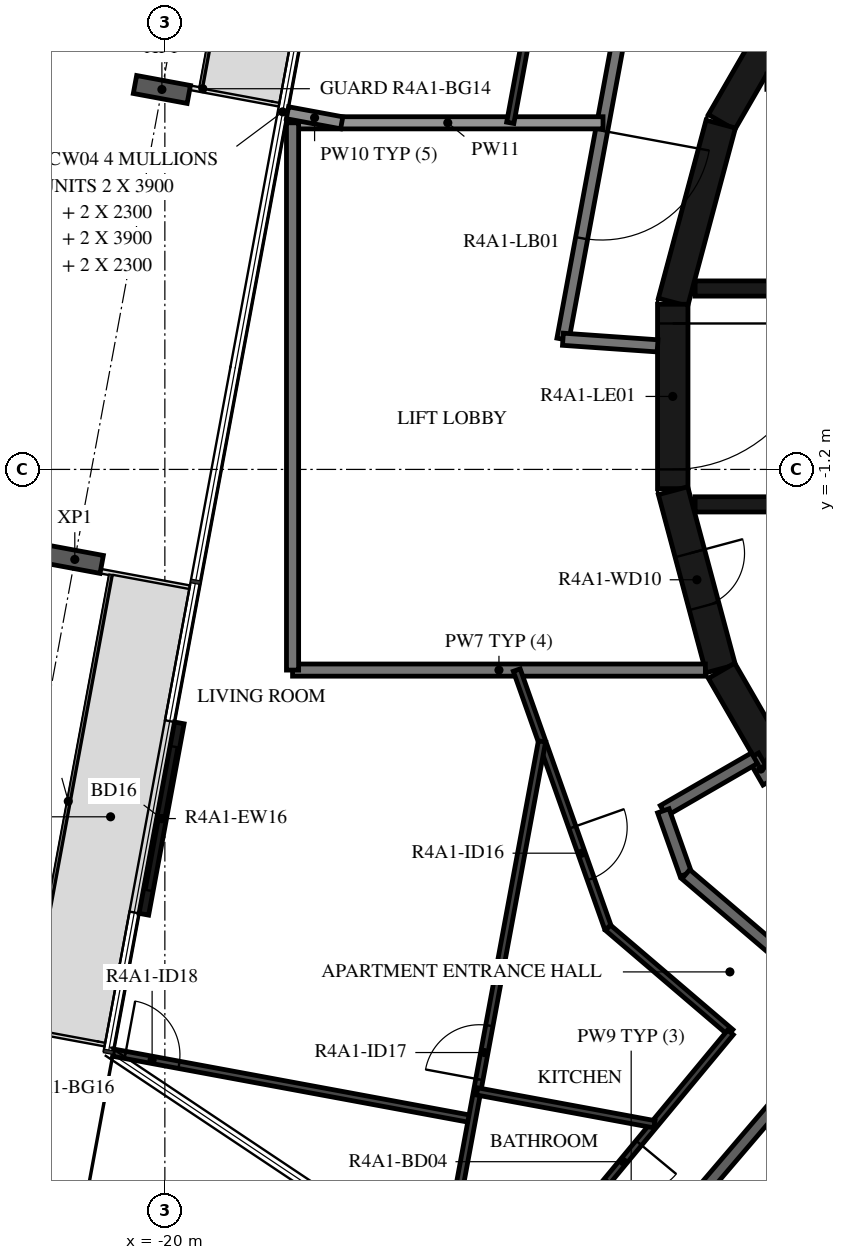
"""IFC4 building model, lengths in metres.
Left out: names, types, materials, properties, quantities, classifications, styles, units other than length and angle.
Written with IfcOpenShell. Run it as: python <this file> out.ifc"""

import sys

from ifc_helpers import new_model, si_unit, direction, frame, frame_2d, origin, origin_2d, place, context, subcontext, project, spatial, rectangle, i_section, extrude, element, fill, save


model = new_model("IFC4")
c1 = context("Model", 3, precision=1e-05, world=origin(), true_north=direction((0.0, 1.0)))
c2 = subcontext(c1, "Body", "Model", "MODEL_VIEW")
j1 = project(units=[si_unit("LENGTHUNIT", "METRE"), si_unit("PLANEANGLEUNIT", "RADIAN")], contexts=[c1])
p1 = place(None, origin())
s1 = spatial("IfcSite", under=j1, at=p1, CompositionType="ELEMENT")
p2 = place(p1, origin())
s2 = spatial("IfcBuilding", under=s1, at=p2, CompositionType="ELEMENT")
p3 = place(p2, frame((0.0, 0.0, 155.2)))
s3 = spatial("IfcBuildingStorey", under=s2, at=p3, CompositionType="ELEMENT", Elevation=155.2)
for number, where, z_axis, x_axis in (
    (1, (-20.049, 5.048, -0.38), (0.0, 0.0, 1.0), (0.182, 0.983, 0.0)),
    (2, (-21.481, -2.68, -0.38), (0.0, 0.0, 1.0), (0.182, 0.983, 0.0)),
):
    element("IfcColumn", number, at=place(p3, frame(where, z_axis=z_axis, x_axis=x_axis)), inside=s3, PredefinedType="COLUMN", context=c2, shape_type="SweptSolid", body=[
        extrude(i_section(OverallWidth=0.3, OverallDepth=0.9, WebThickness=0.019, FlangeThickness=0.035, FilletRadius=0.03, at=origin_2d()), origin(), (0.0, 0.0, 1.0), 3.5),
    ])
p4 = place(p3, frame((-19.762, -5.369, 0.0), z_axis=(0.0, 0.0, 1.0), x_axis=(-0.18226136951, -0.983250117307, 0.0)))
e3 = element("IfcWall", 3, at=p4, inside=s3, PredefinedType="STANDARD", context=c2, shape_type="SweptSolid", body=[
    extrude(rectangle(XDim=3.2, YDim=0.16, at=frame_2d((1.6, 0.0))), origin(), (0.0, 0.0, 1.0), 3.12),
])
p5 = place(p4, frame((0.4, 0.0, 0.0)))
e4 = element("IfcOpeningElement", 4, at=p5, cuts=e3, PredefinedType="OPENING", context=c2, shape_type="SweptSolid", body=[
    extrude(rectangle(XDim=2.4, YDim=2.4, at=frame_2d((1.2, 1.2))), frame((0.0, 0.09, 0.0), z_axis=(0.0, -1.0, 0.0), x_axis=(1.0, 0.0, 0.0)), (0.0, 0.0, 1.0), 0.18),
])
for number, where, z_axis, x_axis in (
    (5, (-9.329, 7.137, 0.0), (0.0, 0.0, 1.0), (-0.5, -0.866, 0.0)),
    (6, (-10.858, 4.479, 0.0), (0.0, 0.0, 1.0), (-0.259, -0.966, 0.0)),
):
    element("IfcWall", number, at=place(p3, frame(where, z_axis=z_axis, x_axis=x_axis)), inside=s3, PredefinedType="SHEAR", context=c2, shape_type="SweptSolid", body=[
        extrude(rectangle(XDim=3.033, YDim=0.5, at=frame_2d((1.516, 0.0))), origin(), (0.0, 0.0, 1.0), 3.12),
    ])
p6 = place(p3, frame((-11.647, 1.516, 0.0), z_axis=(0.0, 0.0, 1.0), x_axis=(0.0, -1.0, 0.0)))
e7 = element("IfcWall", 7, at=p6, inside=s3, PredefinedType="SHEAR", context=c2, shape_type="SweptSolid", body=[
    extrude(rectangle(XDim=3.033, YDim=0.5, at=frame_2d((1.516, 0.0))), origin(), (0.0, 0.0, 1.0), 3.12),
])
p7 = place(p6, frame((0.316, 0.0, 0.0)))
e8 = element("IfcOpeningElement", 8, at=p7, cuts=e7, PredefinedType="OPENING", context=c2, shape_type="SweptSolid", body=[
    extrude(rectangle(XDim=2.4, YDim=2.1, at=frame_2d((1.2, 1.05))), frame((0.0, 0.26, 0.0), z_axis=(0.0, -1.0, 0.0), x_axis=(1.0, 0.0, 0.0)), (0.0, 0.0, 1.0), 0.52),
])
p8 = place(p3, frame((-11.643, -1.55, 0.0), z_axis=(0.0, 0.0, 1.0), x_axis=(0.258734743916, -0.965948410781, 0.0)))
e9 = element("IfcWall", 9, at=p8, inside=s3, PredefinedType="SHEAR", context=c2, shape_type="SweptSolid", body=[
    extrude(rectangle(XDim=3.033, YDim=0.5, at=frame_2d((1.516, 0.0))), origin(), (0.0, 0.0, 1.0), 3.12),
])
p9 = place(p8, frame((1.066, 0.0, 0.0)))
e10 = element("IfcOpeningElement", 10, at=p9, cuts=e9, PredefinedType="OPENING", context=c2, shape_type="SweptSolid", body=[
    extrude(rectangle(XDim=0.9, YDim=2.1, at=frame_2d((0.45, 1.05))), frame((0.0, 0.26, 0.0), z_axis=(0.0, -1.0, 0.0), x_axis=(1.0, 0.0, 0.0)), (0.0, 0.0, 1.0), 0.52),
])
p10 = place(p3, frame((-10.845, -4.51, 0.0), z_axis=(0.0, 0.0, 1.0), x_axis=(0.500087131594, -0.865975092491, 0.0)))
e11 = element("IfcWall", 11, at=p10, inside=s3, PredefinedType="SHEAR", context=c2, shape_type="SweptSolid", body=[
    extrude(rectangle(XDim=3.033, YDim=0.5, at=frame_2d((1.516, 0.0))), origin(), (0.0, 0.0, 1.0), 3.12),
])
p11 = place(p3, frame((-11.28, 1.775, 0.0), z_axis=(0.0, 0.0, 1.0), x_axis=(1.0, 0.0, 0.0)))
e12 = element("IfcWall", 12, at=p11, inside=s3, PredefinedType="SHEAR", context=c2, shape_type="SweptSolid", body=[
    extrude(rectangle(XDim=14.38, YDim=0.25, at=frame_2d((7.19, 0.0))), origin(), (0.0, 0.0, 1.0), 3.12),
])
p12 = place(p11, frame((10.73, 0.0, 0.0)))
e13 = element("IfcOpeningElement", 13, at=p12, cuts=e12, PredefinedType="OPENING", context=c2, shape_type="SweptSolid", body=[
    extrude(rectangle(XDim=1.1, YDim=2.1, at=frame_2d((0.55, 1.05))), frame((0.0, 0.135, 0.0), z_axis=(0.0, -1.0, 0.0), x_axis=(1.0, 0.0, 0.0)), (0.0, 0.0, 1.0), 0.27),
])
p13 = place(p11, frame((12.88, 0.0, 0.0)))
e14 = element("IfcOpeningElement", 14, at=p13, cuts=e12, PredefinedType="OPENING", context=c2, shape_type="SweptSolid", body=[
    extrude(rectangle(XDim=1.1, YDim=2.1, at=frame_2d((0.55, 1.05))), frame((0.0, 0.135, 0.0), z_axis=(0.0, -1.0, 0.0), x_axis=(1.0, 0.0, 0.0)), (0.0, 0.0, 1.0), 0.27),
])
p14 = place(p11, frame((5.455, 0.0, 0.0)))
e15 = element("IfcOpeningElement", 15, at=p14, cuts=e12, PredefinedType="OPENING", context=c2, shape_type="SweptSolid", body=[
    extrude(rectangle(XDim=0.9, YDim=2.1, at=frame_2d((0.45, 1.05))), frame((0.0, 0.135, 0.0), z_axis=(0.0, -1.0, 0.0), x_axis=(1.0, 0.0, 0.0)), (0.0, 0.0, 1.0), 0.27),
])
p15 = place(p3, frame((-11.28, -1.775, 0.0), z_axis=(0.0, 0.0, 1.0), x_axis=(1.0, 0.0, 0.0)))
e16 = element("IfcWall", 16, at=p15, inside=s3, PredefinedType="SHEAR", context=c2, shape_type="SweptSolid", body=[
    extrude(rectangle(XDim=14.38, YDim=0.25, at=frame_2d((7.19, 0.0))), origin(), (0.0, 0.0, 1.0), 3.12),
])
p16 = place(p15, frame((12.88, 0.0, 0.0)))
e17 = element("IfcOpeningElement", 17, at=p16, cuts=e16, PredefinedType="OPENING", context=c2, shape_type="SweptSolid", body=[
    extrude(rectangle(XDim=1.1, YDim=2.1, at=frame_2d((0.55, 1.05))), frame((0.0, 0.135, 0.0), z_axis=(0.0, -1.0, 0.0), x_axis=(1.0, 0.0, 0.0)), (0.0, 0.0, 1.0), 0.27),
])
p17 = place(p15, frame((6.53, 0.0, 0.0)))
e18 = element("IfcOpeningElement", 18, at=p17, cuts=e16, PredefinedType="OPENING", context=c2, shape_type="SweptSolid", body=[
    extrude(rectangle(XDim=0.9, YDim=2.1, at=frame_2d((0.45, 1.05))), frame((0.0, 0.135, 0.0), z_axis=(0.0, -1.0, 0.0), x_axis=(1.0, 0.0, 0.0)), (0.0, 0.0, 1.0), 0.27),
])
p18 = place(p15, frame((8.68, 0.0, 0.0)))
e19 = element("IfcOpeningElement", 19, at=p18, cuts=e16, PredefinedType="OPENING", context=c2, shape_type="SweptSolid", body=[
    extrude(rectangle(XDim=0.9, YDim=2.1, at=frame_2d((0.45, 1.05))), frame((0.0, 0.135, 0.0), z_axis=(0.0, -1.0, 0.0), x_axis=(1.0, 0.0, 0.0)), (0.0, 0.0, 1.0), 0.27),
])
p19 = place(p15, frame((10.83, 0.0, 0.0)))
e20 = element("IfcOpeningElement", 20, at=p19, cuts=e16, PredefinedType="OPENING", context=c2, shape_type="SweptSolid", body=[
    extrude(rectangle(XDim=0.9, YDim=2.1, at=frame_2d((0.45, 1.05))), frame((0.0, 0.135, 0.0), z_axis=(0.0, -1.0, 0.0), x_axis=(1.0, 0.0, 0.0)), (0.0, 0.0, 1.0), 0.27),
])
p20 = place(p3, frame((-12.521, 5.972, 0.0), z_axis=(0.0, 0.0, 1.0), x_axis=(-0.182251559718, -0.983251935661, 0.0)))
e21 = element("IfcWall", 21, at=p20, inside=s3, PredefinedType="STANDARD", context=c2, shape_type="SweptSolid", body=[
    extrude(rectangle(XDim=5.117, YDim=0.2, at=frame_2d((2.559, 0.0))), origin(), (0.0, 0.0, 1.0), 3.12),
])
p21 = place(p20, frame((1.627, 0.0, 0.0)))
e22 = element("IfcOpeningElement", 22, at=p21, cuts=e21, PredefinedType="OPENING", context=c2, shape_type="SweptSolid", body=[
    extrude(rectangle(XDim=1.8, YDim=2.1, at=frame_2d((0.9, 1.05))), frame((0.0, 0.11, 0.0), z_axis=(0.0, -1.0, 0.0), x_axis=(1.0, 0.0, 0.0)), (0.0, 0.0, 1.0), 0.22),
])
p22 = place(p3, frame((-13.454, 0.941, 0.0), z_axis=(0.0, 0.0, 1.0), x_axis=(0.99755155062, -0.069934997354, 0.0)))
e23 = element("IfcWall", 23, at=p22, inside=s3, PredefinedType="STANDARD", context=c2, shape_type="SweptSolid", body=[
    extrude(rectangle(XDim=1.561, YDim=0.2, at=frame_2d((0.78, 0.0))), origin(), (0.0, 0.0, 1.0), 3.12),
])
p23 = place(p3, frame((-10.323, -5.914, 0.0), z_axis=(0.0, 0.0, 1.0), x_axis=(0.500137201729, -0.865946175837, 0.0)))
e24 = element("IfcWall", 24, at=p23, inside=s3, PredefinedType="STANDARD", context=c2, shape_type="SweptSolid", body=[
    extrude(rectangle(XDim=0.492, YDim=0.2, at=frame_2d((0.246, 0.0))), origin(), (0.0, 0.0, 1.0), 3.12),
])
p24 = place(p3, frame((-10.303, -5.949, 0.0), z_axis=(0.0, 0.0, 1.0), x_axis=(-0.866021168401, -0.500007335828, 0.0)))
e25 = element("IfcWall", 25, at=p24, inside=s3, PredefinedType="STANDARD", context=c2, shape_type="SweptSolid", body=[
    extrude(rectangle(XDim=1.731, YDim=0.2, at=frame_2d((0.865, 0.0))), origin(), (0.0, 0.0, 1.0), 3.12),
])
p25 = place(p3, frame((-11.802, -6.814, 0.0), z_axis=(0.0, 0.0, 1.0), x_axis=(0.333904297771, -0.942606980629, 0.0)))
e26 = element("IfcWall", 26, at=p25, inside=s3, PredefinedType="STANDARD", context=c2, shape_type="SweptSolid", body=[
    extrude(rectangle(XDim=1.107, YDim=0.2, at=frame_2d((0.553, 0.0))), origin(), (0.0, 0.0, 1.0), 3.12),
])
p26 = place(p3, frame((-11.433, -7.858, 0.0), z_axis=(0.0, 0.0, 1.0), x_axis=(0.760412154545, -0.649440801937, 0.0)))
e27 = element("IfcWall", 27, at=p26, inside=s3, PredefinedType="STANDARD", context=c2, shape_type="SweptSolid", body=[
    extrude(rectangle(XDim=7.181, YDim=0.2, at=frame_2d((3.59, 0.0))), origin(), (0.0, 0.0, 1.0), 3.12),
])
p27 = place(p26, frame((2.39, 0.0, 0.0)))
e28 = element("IfcOpeningElement", 28, at=p27, cuts=e27, PredefinedType="OPENING", context=c2, shape_type="SweptSolid", body=[
    extrude(rectangle(XDim=1.0, YDim=2.1, at=frame_2d((0.5, 1.05))), frame((0.0, 0.11, 0.0), z_axis=(0.0, -1.0, 0.0), x_axis=(1.0, 0.0, 0.0)), (0.0, 0.0, 1.0), 0.22),
])
p28 = place(p3, frame((-12.794, 4.5, 0.0), z_axis=(0.0, 0.0, 1.0), x_axis=(-1.0, 0.0, 0.0)))
e29 = element("IfcWall", 29, at=p28, inside=s3, PredefinedType="STANDARD", context=c2, shape_type="SweptSolid", body=[
    extrude(rectangle(XDim=5.106, YDim=0.2, at=frame_2d((2.553, 0.0))), origin(), (0.0, 0.0, 1.0), 2.73),
])
p29 = place(p3, frame((-17.9, -4.5, 0.0), z_axis=(0.0, 0.0, 1.0), x_axis=(1.0, 0.0, 0.0)))
e30 = element("IfcWall", 30, at=p29, inside=s3, PredefinedType="STANDARD", context=c2, shape_type="SweptSolid", body=[
    extrude(rectangle(XDim=6.789, YDim=0.2, at=frame_2d((3.394, 0.0))), origin(), (0.0, 0.0, 1.0), 3.12),
])
p30 = place(p3, frame((-17.9, 4.5, 0.0), z_axis=(0.0, 0.0, 1.0), x_axis=(0.0, -1.0, 0.0)))
e31 = element("IfcWall", 31, at=p30, inside=s3, PredefinedType="STANDARD", context=c2, shape_type="SweptSolid", body=[
    extrude(rectangle(XDim=9.0, YDim=0.2, at=frame_2d((4.5, 0.0))), origin(), (0.0, 0.0, 1.0), 3.12),
])
p31 = place(p3, frame((-17.984, 4.665, 0.0), z_axis=(0.0, 0.0, 1.0), x_axis=(0.98328378843, -0.182079629313, 0.0)))
e32 = element("IfcWall", 32, at=p31, inside=s3, PredefinedType="STANDARD", context=c2, shape_type="SweptSolid", body=[
    extrude(rectangle(XDim=0.908, YDim=0.2, at=frame_2d((0.454, 0.0))), origin(), (0.0, 0.0, 1.0), 2.73),
])
p32 = place(p3, frame((-11.838, -13.86, 0.0), z_axis=(0.0, 0.0, 1.0), x_axis=(0.64944503311, 0.760408540831, 0.0)))
e33 = element("IfcWall", 33, at=p32, inside=s3, PredefinedType="STANDARD", context=c2, shape_type="SweptSolid", body=[
    extrude(rectangle(XDim=4.827, YDim=0.2, at=frame_2d((2.414, 0.0))), origin(), (0.0, 0.0, 1.0), 3.12),
])
p33 = place(p3, frame((-13.923, 6.641, 0.0), z_axis=(0.0, 0.0, 1.0), x_axis=(-0.182209715759, -0.983259690765, 0.0)))
e34 = element("IfcWall", 34, at=p33, inside=s3, PredefinedType="PARTITIONING", context=c2, shape_type="SweptSolid", body=[
    extrude(rectangle(XDim=2.177, YDim=0.12, at=frame_2d((1.089, 0.0))), origin(), (0.0, 0.0, 1.0), 3.12),
])
p34 = place(p3, frame((-14.213, -4.5, 0.0), z_axis=(0.0, 0.0, 1.0), x_axis=(0.333802904542, -0.942642891513, 0.0)))
e35 = element("IfcWall", 35, at=p34, inside=s3, PredefinedType="PARTITIONING", context=c2, shape_type="SweptSolid", body=[
    extrude(rectangle(XDim=4.495, YDim=0.12, at=frame_2d((2.248, 0.0))), origin(), (0.0, 0.0, 1.0), 3.12),
])
p35 = place(p34, frame((2.744, 0.0, 0.0)))
e36 = element("IfcOpeningElement", 36, at=p35, cuts=e35, PredefinedType="OPENING", context=c2, shape_type="SweptSolid", body=[
    extrude(rectangle(XDim=0.9, YDim=2.1, at=frame_2d((0.45, 1.05))), frame((0.0, 0.07, 0.0), z_axis=(0.0, -1.0, 0.0), x_axis=(1.0, 0.0, 0.0)), (0.0, 0.0, 1.0), 0.14),
])
p36 = place(p3, frame((-12.713, -8.737, 0.0), z_axis=(0.0, 0.0, 1.0), x_axis=(0.760400223405, -0.649454771517, 0.0)))
e37 = element("IfcWall", 37, at=p36, inside=s3, PredefinedType="PARTITIONING", context=c2, shape_type="SweptSolid", body=[
    extrude(rectangle(XDim=2.649, YDim=0.12, at=frame_2d((1.325, 0.0))), origin(), (0.0, 0.0, 1.0), 3.12),
])
p37 = place(p3, frame((-10.698, -10.458, 0.0), z_axis=(0.0, 0.0, 1.0), x_axis=(-0.63830561059, -0.769783052223, 0.0)))
e38 = element("IfcWall", 38, at=p37, inside=s3, PredefinedType="PARTITIONING", context=c2, shape_type="SweptSolid", body=[
    extrude(rectangle(XDim=5.131, YDim=0.12, at=frame_2d((2.565, 0.0))), origin(), (0.0, 0.0, 1.0), 3.12),
])
p38 = place(p37, frame((2.363, 0.0, 0.0)))
e39 = element("IfcOpeningElement", 39, at=p38, cuts=e38, PredefinedType="OPENING", context=c2, shape_type="SweptSolid", body=[
    extrude(rectangle(XDim=0.8, YDim=2.1, at=frame_2d((0.4, 1.05))), frame((0.0, 0.07, 0.0), z_axis=(0.0, -1.0, 0.0), x_axis=(1.0, 0.0, 0.0)), (0.0, 0.0, 1.0), 0.14),
])
p39 = place(p3, frame((-20.849, -10.792, 0.0), z_axis=(0.0, 0.0, 1.0), x_axis=(0.983251500113, -0.182253909494, 0.0)))
e40 = element("IfcWall", 40, at=p39, inside=s3, PredefinedType="PARTITIONING", context=c2, shape_type="SweptSolid", body=[
    extrude(rectangle(XDim=6.0, YDim=0.12, at=frame_2d((3.0, 0.0))), origin(), (0.0, 0.0, 1.0), 2.73),
])
p40 = place(p39, frame((0.2, 0.0, 0.0)))
e41 = element("IfcOpeningElement", 41, at=p40, cuts=e40, PredefinedType="OPENING", context=c2, shape_type="SweptSolid", body=[
    extrude(rectangle(XDim=0.9, YDim=2.1, at=frame_2d((0.45, 1.05))), frame((0.0, 0.07, 0.0), z_axis=(0.0, -1.0, 0.0), x_axis=(1.0, 0.0, 0.0)), (0.0, 0.0, 1.0), 0.14),
])
p41 = place(p3, frame((-15.554, -15.149, 0.0), z_axis=(0.0, 0.0, 1.0), x_axis=(0.182237116667, 0.983254612656, 0.0)))
e42 = element("IfcWall", 42, at=p41, inside=s3, PredefinedType="PARTITIONING", context=c2, shape_type="SweptSolid", body=[
    extrude(rectangle(XDim=9.638, YDim=0.12, at=frame_2d((4.819, 0.0))), origin(), (0.0, 0.0, 1.0), 3.12),
])
p42 = place(p41, frame((3.984, 0.0, 0.0)))
e43 = element("IfcOpeningElement", 43, at=p42, cuts=e42, PredefinedType="OPENING", context=c2, shape_type="SweptSolid", body=[
    extrude(rectangle(XDim=0.9, YDim=2.1, at=frame_2d((0.45, 1.05))), frame((0.0, 0.07, 0.0), z_axis=(0.0, -1.0, 0.0), x_axis=(1.0, 0.0, 0.0)), (0.0, 0.0, 1.0), 0.14),
])
p43 = place(p3, frame((-14.865, -11.428, 0.0), z_axis=(0.0, 0.0, 1.0), x_axis=(0.983255224962, -0.182233812955, 0.0)))
e44 = element("IfcWall", 44, at=p43, inside=s3, PredefinedType="PARTITIONING", context=c2, shape_type="SweptSolid", body=[
    extrude(rectangle(XDim=2.963, YDim=0.12, at=frame_2d((1.482, 0.0))), origin(), (0.0, 0.0, 1.0), 3.12),
])
p44 = place(p5, origin())
e45 = element("IfcDoor", 45, at=p44, inside=s3, OperationType="DOUBLE_DOOR_SLIDING", PredefinedType="DOOR", context=c2, shape_type="SweptSolid", body=[
    extrude(rectangle(XDim=2.4, YDim=2.4, at=frame_2d((1.2, 1.2))), frame((0.0, 0.025, 0.0), z_axis=(0.0, -1.0, 0.0), x_axis=(1.0, 0.0, 0.0)), (0.0, 0.0, 1.0), 0.05),
])
fill(e4, e45)
p45 = place(p7, origin())
e46 = element("IfcDoor", 46, at=p45, inside=s3, OperationType="DOUBLE_DOOR_SINGLE_SWING", PredefinedType="DOOR", context=c2, shape_type="SweptSolid", body=[
    extrude(rectangle(XDim=2.4, YDim=2.1, at=frame_2d((1.2, 1.05))), frame((0.0, 0.025, 0.0), z_axis=(0.0, -1.0, 0.0), x_axis=(1.0, 0.0, 0.0)), (0.0, 0.0, 1.0), 0.05),
])
fill(e8, e46)
p46 = place(p9, origin())
e47 = element("IfcDoor", 47, at=p46, inside=s3, OperationType="SINGLE_SWING_RIGHT", PredefinedType="DOOR", context=c2, shape_type="SweptSolid", body=[
    extrude(rectangle(XDim=0.9, YDim=2.1, at=frame_2d((0.45, 1.05))), frame((0.0, 0.025, 0.0), z_axis=(0.0, -1.0, 0.0), x_axis=(1.0, 0.0, 0.0)), (0.0, 0.0, 1.0), 0.05),
])
fill(e10, e47)
p47 = place(p35, origin())
e48 = element("IfcDoor", 48, at=p47, inside=s3, OperationType="SINGLE_SWING_RIGHT", PredefinedType="DOOR", context=c2, shape_type="SweptSolid", body=[
    extrude(rectangle(XDim=0.9, YDim=2.1, at=frame_2d((0.45, 1.05))), frame((0.0, 0.025, 0.0), z_axis=(0.0, -1.0, 0.0), x_axis=(1.0, 0.0, 0.0)), (0.0, 0.0, 1.0), 0.05),
])
fill(e36, e48)
p48 = place(p38, origin())
e49 = element("IfcDoor", 49, at=p48, inside=s3, OperationType="SINGLE_SWING_RIGHT", PredefinedType="DOOR", context=c2, shape_type="SweptSolid", body=[
    extrude(rectangle(XDim=0.8, YDim=2.1, at=frame_2d((0.4, 1.05))), frame((0.0, 0.025, 0.0), z_axis=(0.0, -1.0, 0.0), x_axis=(1.0, 0.0, 0.0)), (0.0, 0.0, 1.0), 0.05),
])
fill(e39, e49)
p49 = place(p42, origin())
e50 = element("IfcDoor", 50, at=p49, inside=s3, OperationType="SINGLE_SWING_RIGHT", PredefinedType="DOOR", context=c2, shape_type="SweptSolid", body=[
    extrude(rectangle(XDim=0.9, YDim=2.1, at=frame_2d((0.45, 1.05))), frame((0.0, 0.025, 0.0), z_axis=(0.0, -1.0, 0.0), x_axis=(1.0, 0.0, 0.0)), (0.0, 0.0, 1.0), 0.05),
])
fill(e43, e50)
p50 = place(p40, origin())
e51 = element("IfcDoor", 51, at=p50, inside=s3, OperationType="SINGLE_SWING_RIGHT", PredefinedType="DOOR", context=c2, shape_type="SweptSolid", body=[
    extrude(rectangle(XDim=0.9, YDim=2.1, at=frame_2d((0.45, 1.05))), frame((0.0, 0.025, 0.0), z_axis=(0.0, -1.0, 0.0), x_axis=(1.0, 0.0, 0.0)), (0.0, 0.0, 1.0), 0.05),
])
fill(e41, e51)
p51 = place(p21, origin())
e52 = element("IfcDoor", 52, at=p51, inside=s3, OperationType="DOUBLE_DOOR_SINGLE_SWING", PredefinedType="DOOR", context=c2, shape_type="SweptSolid", body=[
    extrude(rectangle(XDim=1.8, YDim=2.1, at=frame_2d((0.9, 1.05))), frame((0.0, 0.025, 0.0), z_axis=(0.0, -1.0, 0.0), x_axis=(1.0, 0.0, 0.0)), (0.0, 0.0, 1.0), 0.05),
])
fill(e22, e52)
save(model, sys.argv[1])
